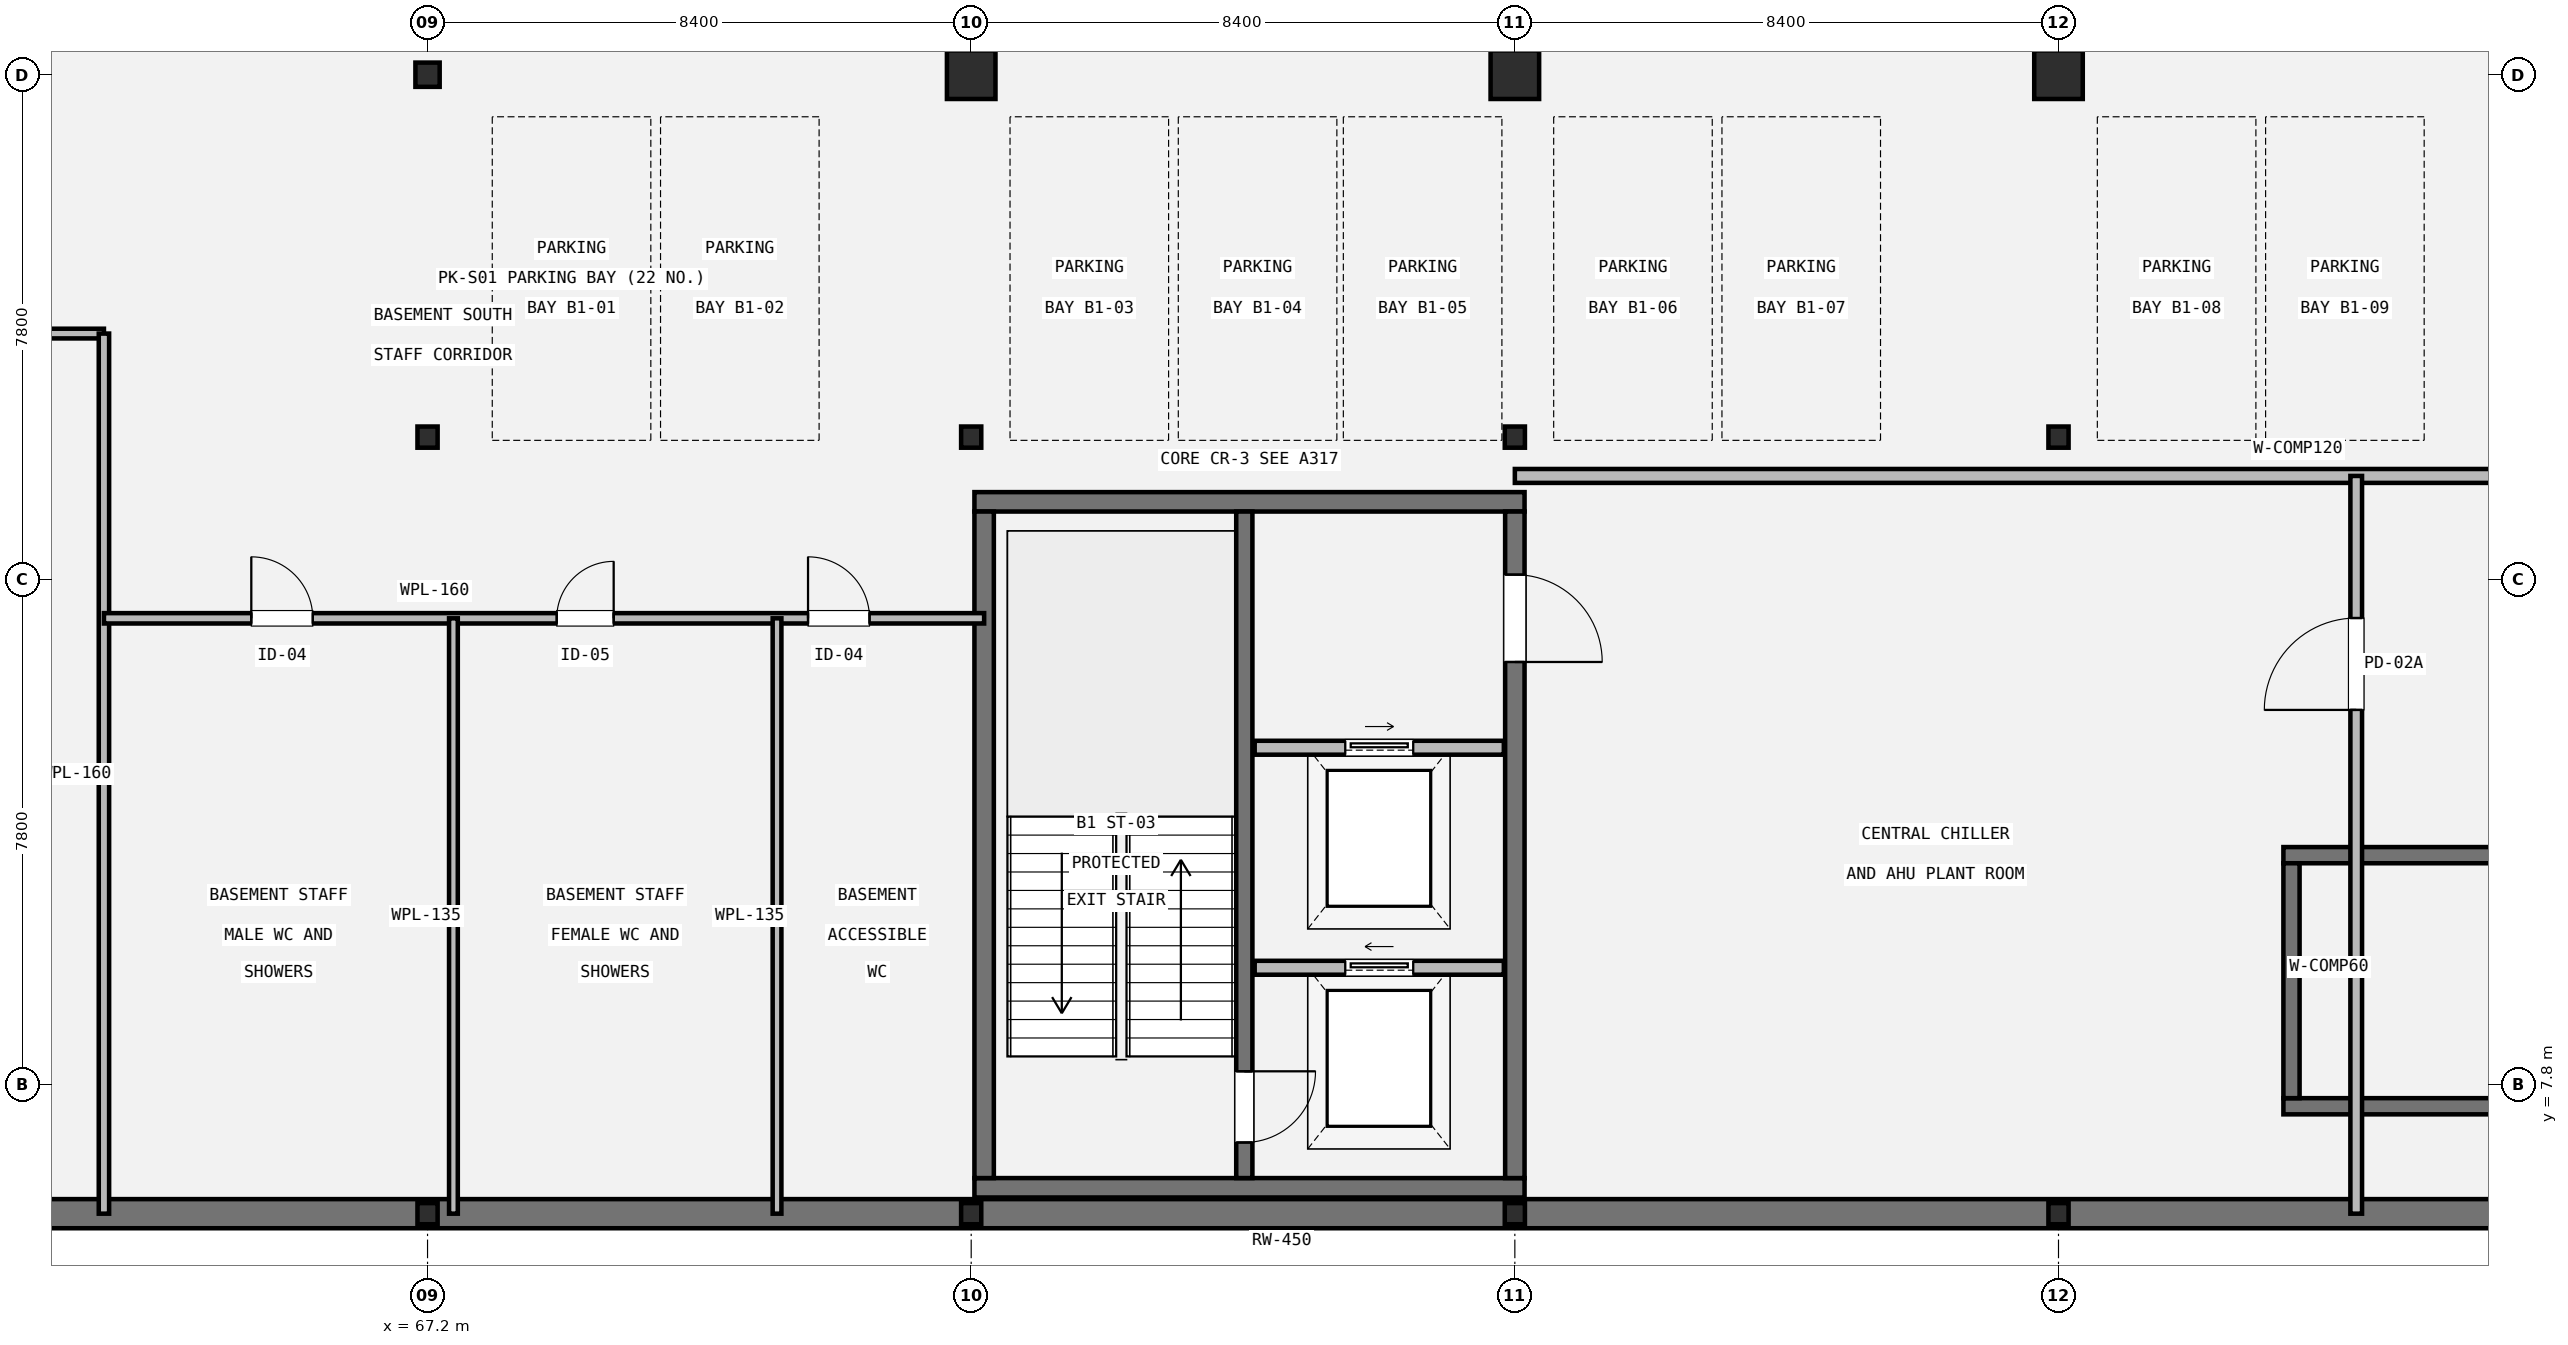
"""IFC4 building model, lengths in metres.
Left out: names, types, materials, properties, quantities, classifications, styles, units other than length and angle.
Written with IfcOpenShell. Run it as: python <this file> out.ifc"""

import sys

from ifc_helpers import new_model, si_unit, direction, frame, frame_2d, origin, origin_2d, place, context, subcontext, project, spatial, rectangle, i_section, extrude, element, fill, save


model = new_model("IFC4")
c1 = context("Model", 3, precision=1e-05, world=origin(), true_north=direction((0.0, 1.0)))
c2 = subcontext(c1, "Body", "Model", "MODEL_VIEW")
j1 = project(units=[si_unit("LENGTHUNIT", "METRE"), si_unit("PLANEANGLEUNIT", "RADIAN")], contexts=[c1])
p1 = place(None, origin())
s1 = spatial("IfcSite", under=j1, at=p1, CompositionType="ELEMENT")
p2 = place(p1, origin())
s2 = spatial("IfcBuilding", under=s1, at=p2, CompositionType="ELEMENT")
p3 = place(p2, frame((0.0, 0.0, -4.5)))
s3 = spatial("IfcBuildingStorey", under=s2, at=p3, CompositionType="ELEMENT", Elevation=-4.5)
p4 = place(p3, frame((67.2, 23.4, 0.0), z_axis=(0.0, 0.0, 1.0), x_axis=(1.0, 0.0, 0.0)))
e1 = element("IfcColumn", 1, at=p4, inside=s3, PredefinedType="COLUMN", context=c2, shape_type="SweptSolid", body=[
    extrude(i_section(OverallWidth=0.375, OverallDepth=0.375, WebThickness=0.017, FlangeThickness=0.027, FilletRadius=0.015, at=origin_2d()), origin(), (0.0, 0.0, 1.0), 4.5),
])
for number, where, z_axis, x_axis in (
    (2, (67.2, 5.8, 0.0), (0.0, 0.0, 1.0), (1.0, 0.0, 0.0)),
    (3, (67.2, 17.8, 0.0), (0.0, 0.0, 1.0), (1.0, 0.0, 0.0)),
    (4, (75.6, 5.8, 0.0), (0.0, 0.0, 1.0), (1.0, 0.0, 0.0)),
    (5, (75.6, 17.8, 0.0), (0.0, 0.0, 1.0), (1.0, 0.0, 0.0)),
    (6, (84.0, 5.8, 0.0), (0.0, 0.0, 1.0), (1.0, 0.0, 0.0)),
    (7, (84.0, 17.8, 0.0), (0.0, 0.0, 1.0), (1.0, 0.0, 0.0)),
    (8, (92.4, 5.8, 0.0), (0.0, 0.0, 1.0), (1.0, 0.0, 0.0)),
    (9, (92.4, 17.8, 0.0), (0.0, 0.0, 1.0), (1.0, 0.0, 0.0)),
):
    element("IfcColumn", number, at=place(p3, frame(where, z_axis=z_axis, x_axis=x_axis)), inside=s3, PredefinedType="COLUMN", context=c2, shape_type="SweptSolid", body=[
        extrude(i_section(OverallWidth=0.311, OverallDepth=0.327, WebThickness=0.016, FlangeThickness=0.025, FilletRadius=0.015, at=origin_2d()), origin(), (0.0, 0.0, 1.0), 4.5),
    ])
for number, where, z_axis, x_axis in (
    (10, (75.6, 23.4, 0.0), (0.0, 0.0, 1.0), (1.0, 0.0, 0.0)),
    (11, (84.0, 23.4, 0.0), (0.0, 0.0, 1.0), (1.0, 0.0, 0.0)),
    (12, (92.4, 23.4, 0.0), (0.0, 0.0, 1.0), (1.0, 0.0, 0.0)),
):
    element("IfcColumn", number, at=place(p3, frame(where, z_axis=z_axis, x_axis=x_axis)), inside=s3, PredefinedType="COLUMN", context=c2, shape_type="SweptSolid", body=[
        extrude(rectangle(XDim=0.75, YDim=0.75, at=origin_2d()), origin(), (0.0, 0.0, 1.0), 4.5),
    ])
p5 = place(p3, frame((117.6, 5.8, 0.0), z_axis=(0.0, 0.0, 1.0), x_axis=(-1.0, 0.0, 0.0)))
e13 = element("IfcWall", 13, at=p5, inside=s3, PredefinedType="USERDEFINED", context=c2, shape_type="SweptSolid", body=[
    extrude(rectangle(XDim=79.6, YDim=0.45, at=frame_2d((39.8, 0.0))), origin(), (0.0, 0.0, 1.0), 4.24),
])
for number, where, z_axis, x_axis in (
    (14, (106.285, 7.46, 0.0), (0.0, 0.0, 1.0), (-1.0, 0.0, 0.0)),
    (15, (95.875, 11.34, 0.0), (0.0, 0.0, 1.0), (1.0, 0.0, 0.0)),
):
    element("IfcWall", number, at=place(p3, frame(where, z_axis=z_axis, x_axis=x_axis)), inside=s3, PredefinedType="SHEAR", context=c2, shape_type="SweptSolid", body=[
        extrude(rectangle(XDim=10.41, YDim=0.25, at=frame_2d((5.205, 0.0))), origin(), (0.0, 0.0, 1.0), 4.24),
    ])
p6 = place(p3, frame((96.0, 7.585, 0.0), z_axis=(0.0, 0.0, 1.0), x_axis=(0.0, 1.0, 0.0)))
e16 = element("IfcWall", 16, at=p6, inside=s3, PredefinedType="SHEAR", context=c2, shape_type="SweptSolid", body=[
    extrude(rectangle(XDim=3.63, YDim=0.25, at=frame_2d((1.815, 0.0))), origin(), (0.0, 0.0, 1.0), 4.24),
])
for number, where, z_axis, x_axis in (
    (17, (84.15, 6.2, 0.0), (0.0, 0.0, 1.0), (-1.0, 0.0, 0.0)),
    (18, (75.65, 16.8, 0.0), (0.0, 0.0, 1.0), (1.0, 0.0, 0.0)),
):
    element("IfcWall", number, at=place(p3, frame(where, z_axis=z_axis, x_axis=x_axis)), inside=s3, PredefinedType="SHEAR", context=c2, shape_type="SweptSolid", body=[
        extrude(rectangle(XDim=8.5, YDim=0.3, at=frame_2d((4.25, 0.0))), origin(), (0.0, 0.0, 1.0), 4.25),
    ])
p7 = place(p3, frame((75.8, 6.35, 0.0), z_axis=(0.0, 0.0, 1.0), x_axis=(0.0, 1.0, 0.0)))
e19 = element("IfcWall", 19, at=p7, inside=s3, PredefinedType="SHEAR", context=c2, shape_type="SweptSolid", body=[
    extrude(rectangle(XDim=10.3, YDim=0.3, at=frame_2d((5.15, 0.0))), origin(), (0.0, 0.0, 1.0), 4.25),
])
p8 = place(p3, frame((84.0, 16.65, 0.0), z_axis=(0.0, 0.0, 1.0), x_axis=(0.0, -1.0, 0.0)))
e20 = element("IfcWall", 20, at=p8, inside=s3, PredefinedType="SHEAR", context=c2, shape_type="SweptSolid", body=[
    extrude(rectangle(XDim=10.3, YDim=0.3, at=frame_2d((5.15, 0.0))), origin(), (0.0, 0.0, 1.0), 4.25),
])
p9 = place(p8, frame((0.975, 0.0, 0.0)))
e21 = element("IfcOpeningElement", 21, at=p9, cuts=e20, PredefinedType="OPENING", context=c2, shape_type="SweptSolid", body=[
    extrude(rectangle(XDim=1.35, YDim=2.15, at=frame_2d((0.675, 1.075))), frame((0.0, 0.16, 0.0), z_axis=(0.0, -1.0, 0.0), x_axis=(1.0, 0.0, 0.0)), (0.0, 0.0, 1.0), 0.32),
])
p10 = place(p3, frame((79.82, 16.65, 0.0), z_axis=(0.0, 0.0, 1.0), x_axis=(0.0, -1.0, 0.0)))
e22 = element("IfcWall", 22, at=p10, inside=s3, PredefinedType="SHEAR", context=c2, shape_type="SweptSolid", body=[
    extrude(rectangle(XDim=10.3, YDim=0.25, at=frame_2d((5.15, 0.0))), origin(), (0.0, 0.0, 1.0), 4.25),
])
p11 = place(p10, frame((8.65, 0.0, 0.0)))
e23 = element("IfcOpeningElement", 23, at=p11, cuts=e22, PredefinedType="OPENING", context=c2, shape_type="SweptSolid", body=[
    extrude(rectangle(XDim=1.1, YDim=2.15, at=frame_2d((0.55, 1.075))), frame((0.0, 0.135, 0.0), z_axis=(0.0, -1.0, 0.0), x_axis=(1.0, 0.0, 0.0)), (0.0, 0.0, 1.0), 0.27),
])
p12 = place(p3, frame((79.98, 9.6, 0.0), z_axis=(0.0, 0.0, 1.0), x_axis=(1.0, 0.0, 0.0)))
e24 = element("IfcWall", 24, at=p12, inside=s3, PredefinedType="STANDARD", context=c2, shape_type="SweptSolid", body=[
    extrude(rectangle(XDim=3.85, YDim=0.215, at=frame_2d((1.925, 0.0))), origin(), (0.0, 0.0, 1.0), 3.625),
])
p13 = place(p12, frame((1.4, 0.0, 0.0)))
e25 = element("IfcOpeningElement", 25, at=p13, cuts=e24, PredefinedType="OPENING", context=c2, shape_type="SweptSolid", body=[
    extrude(rectangle(XDim=1.05, YDim=2.15, at=frame_2d((0.525, 1.075))), frame((0.0, 0.117, 0.0), z_axis=(0.0, -1.0, 0.0), x_axis=(1.0, 0.0, 0.0)), (0.0, 0.0, 1.0), 0.235),
])
p14 = place(p3, frame((79.98, 13.0, 0.0), z_axis=(0.0, 0.0, 1.0), x_axis=(1.0, 0.0, 0.0)))
e26 = element("IfcWall", 26, at=p14, inside=s3, PredefinedType="STANDARD", context=c2, shape_type="SweptSolid", body=[
    extrude(rectangle(XDim=3.85, YDim=0.215, at=frame_2d((1.925, 0.0))), origin(), (0.0, 0.0, 1.0), 3.625),
])
p15 = place(p14, frame((1.4, 0.0, 0.0)))
e27 = element("IfcOpeningElement", 27, at=p15, cuts=e26, PredefinedType="OPENING", context=c2, shape_type="SweptSolid", body=[
    extrude(rectangle(XDim=1.05, YDim=2.15, at=frame_2d((0.525, 1.075))), frame((0.0, 0.117, 0.0), z_axis=(0.0, -1.0, 0.0), x_axis=(1.0, 0.0, 0.0)), (0.0, 0.0, 1.0), 0.235),
])
p16 = place(p3, frame((33.6, 19.4, 0.0), z_axis=(0.0, 0.0, 1.0), x_axis=(1.0, 0.0, 0.0)))
e28 = element("IfcWall", 28, at=p16, inside=s3, PredefinedType="PARTITIONING", context=c2, shape_type="SweptSolid", body=[
    extrude(rectangle(XDim=28.6, YDim=0.15, at=frame_2d((14.3, 0.0))), origin(), (0.0, 0.0, 1.0), 3.703),
])
p17 = place(p16, frame((6.895, 0.0, 0.0)))
e29 = element("IfcOpeningElement", 29, at=p17, cuts=e28, PredefinedType="OPENING", context=c2, shape_type="SweptSolid", body=[
    extrude(rectangle(XDim=1.02, YDim=2.1, at=frame_2d((0.51, 1.05))), frame((0.0, 0.085, 0.0), z_axis=(0.0, -1.0, 0.0), x_axis=(1.0, 0.0, 0.0)), (0.0, 0.0, 1.0), 0.17),
])
p18 = place(p16, frame((20.685, 0.0, 0.0)))
e30 = element("IfcOpeningElement", 30, at=p18, cuts=e28, PredefinedType="OPENING", context=c2, shape_type="SweptSolid", body=[
    extrude(rectangle(XDim=1.02, YDim=2.1, at=frame_2d((0.51, 1.05))), frame((0.0, 0.085, 0.0), z_axis=(0.0, -1.0, 0.0), x_axis=(1.0, 0.0, 0.0)), (0.0, 0.0, 1.0), 0.17),
])
p19 = place(p3, frame((62.2, 5.8, 0.0), z_axis=(0.0, 0.0, 1.0), x_axis=(0.0, 1.0, 0.0)))
e31 = element("IfcWall", 31, at=p19, inside=s3, PredefinedType="PLUMBINGWALL", context=c2, shape_type="SweptSolid", body=[
    extrude(rectangle(XDim=13.6, YDim=0.16, at=frame_2d((6.8, 0.0))), origin(), (0.0, 0.0, 1.0), 3.709),
])
p20 = place(p3, frame((62.2, 15.0, 0.0), z_axis=(0.0, 0.0, 1.0), x_axis=(1.0, 0.0, 0.0)))
e32 = element("IfcWall", 32, at=p20, inside=s3, PredefinedType="PLUMBINGWALL", context=c2, shape_type="SweptSolid", body=[
    extrude(rectangle(XDim=13.6, YDim=0.16, at=frame_2d((6.8, 0.0))), origin(), (0.0, 0.0, 1.0), 3.472),
])
p21 = place(p20, frame((2.277, 0.0, 0.0)))
e33 = element("IfcOpeningElement", 33, at=p21, cuts=e32, PredefinedType="OPENING", context=c2, shape_type="SweptSolid", body=[
    extrude(rectangle(XDim=0.95, YDim=2.1, at=frame_2d((0.475, 1.05))), frame((0.0, 0.09, 0.0), z_axis=(0.0, -1.0, 0.0), x_axis=(1.0, 0.0, 0.0)), (0.0, 0.0, 1.0), 0.18),
])
p22 = place(p20, frame((6.996, 0.0, 0.0)))
e34 = element("IfcOpeningElement", 34, at=p22, cuts=e32, PredefinedType="OPENING", context=c2, shape_type="SweptSolid", body=[
    extrude(rectangle(XDim=0.88, YDim=2.05, at=frame_2d((0.44, 1.025))), frame((0.0, 0.09, 0.0), z_axis=(0.0, -1.0, 0.0), x_axis=(1.0, 0.0, 0.0)), (0.0, 0.0, 1.0), 0.18),
])
p23 = place(p20, frame((10.879, 0.0, 0.0)))
e35 = element("IfcOpeningElement", 35, at=p23, cuts=e32, PredefinedType="OPENING", context=c2, shape_type="SweptSolid", body=[
    extrude(rectangle(XDim=0.95, YDim=2.1, at=frame_2d((0.475, 1.05))), frame((0.0, 0.09, 0.0), z_axis=(0.0, -1.0, 0.0), x_axis=(1.0, 0.0, 0.0)), (0.0, 0.0, 1.0), 0.18),
])
for number, where, z_axis, x_axis in (
    (36, (67.6, 5.8, 0.0), (0.0, 0.0, 1.0), (0.0, 1.0, 0.0)),
    (37, (72.6, 5.8, 0.0), (0.0, 0.0, 1.0), (0.0, 1.0, 0.0)),
):
    element("IfcWall", number, at=place(p3, frame(where, z_axis=z_axis, x_axis=x_axis)), inside=s3, PredefinedType="PLUMBINGWALL", context=c2, shape_type="SweptSolid", body=[
        extrude(rectangle(XDim=9.2, YDim=0.135, at=frame_2d((4.6, 0.0))), origin(), (0.0, 0.0, 1.0), 3.709),
    ])
p24 = place(p3, frame((84.0, 17.2, 0.0), z_axis=(0.0, 0.0, 1.0), x_axis=(1.0, 0.0, 0.0)))
e38 = element("IfcWall", 38, at=p24, inside=s3, PredefinedType="STANDARD", context=c2, shape_type="SweptSolid", body=[
    extrude(rectangle(XDim=33.6, YDim=0.215, at=frame_2d((16.8, 0.0))), origin(), (0.0, 0.0, 1.0), 3.625),
])
p25 = place(p24, frame((27.433, 0.0, 0.0)))
e39 = element("IfcOpeningElement", 39, at=p25, cuts=e38, PredefinedType="OPENING", context=c2, shape_type="SweptSolid", body=[
    extrude(rectangle(XDim=1.25, YDim=2.15, at=frame_2d((0.625, 1.075))), frame((0.0, 0.117, 0.0), z_axis=(0.0, -1.0, 0.0), x_axis=(1.0, 0.0, 0.0)), (0.0, 0.0, 1.0), 0.235),
])
p26 = place(p3, frame((97.0, 5.8, 0.0), z_axis=(0.0, 0.0, 1.0), x_axis=(0.0, 1.0, 0.0)))
e40 = element("IfcWall", 40, at=p26, inside=s3, PredefinedType="STANDARD", context=c2, shape_type="SweptSolid", body=[
    extrude(rectangle(XDim=11.4, YDim=0.18, at=frame_2d((5.7, 0.0))), origin(), (0.0, 0.0, 1.0), 3.709),
])
p27 = place(p26, frame((7.784, 0.0, 0.0)))
e41 = element("IfcOpeningElement", 41, at=p27, cuts=e40, PredefinedType="OPENING", context=c2, shape_type="SweptSolid", body=[
    extrude(rectangle(XDim=1.42, YDim=2.2, at=frame_2d((0.71, 1.1))), frame((0.0, 0.1, 0.0), z_axis=(0.0, -1.0, 0.0), x_axis=(1.0, 0.0, 0.0)), (0.0, 0.0, 1.0), 0.2),
])
p28 = place(p11, origin())
e42 = element("IfcDoor", 42, at=p28, inside=s3, OperationType="SINGLE_SWING_LEFT", PredefinedType="DOOR", context=c2, shape_type="SweptSolid", body=[
    extrude(rectangle(XDim=1.1, YDim=2.15, at=frame_2d((0.55, 1.075))), frame((0.0, 0.025, 0.0), z_axis=(0.0, -1.0, 0.0), x_axis=(1.0, 0.0, 0.0)), (0.0, 0.0, 1.0), 0.05),
])
fill(e23, e42)
p29 = place(p9, origin())
e43 = element("IfcDoor", 43, at=p29, inside=s3, OperationType="SINGLE_SWING_RIGHT", PredefinedType="DOOR", context=c2, shape_type="SweptSolid", body=[
    extrude(rectangle(XDim=1.35, YDim=2.15, at=frame_2d((0.675, 1.075))), frame((0.0, 0.025, 0.0), z_axis=(0.0, -1.0, 0.0), x_axis=(1.0, 0.0, 0.0)), (0.0, 0.0, 1.0), 0.05),
])
fill(e21, e43)
p30 = place(p13, origin())
e44 = element("IfcDoor", 44, at=p30, inside=s3, OperationType="SLIDING_TO_LEFT", PredefinedType="DOOR", context=c2, shape_type="SweptSolid", body=[
    extrude(rectangle(XDim=1.05, YDim=2.15, at=frame_2d((0.525, 1.075))), frame((0.0, 0.025, 0.0), z_axis=(0.0, -1.0, 0.0), x_axis=(1.0, 0.0, 0.0)), (0.0, 0.0, 1.0), 0.05),
])
fill(e25, e44)
p31 = place(p15, origin())
e45 = element("IfcDoor", 45, at=p31, inside=s3, OperationType="SLIDING_TO_RIGHT", PredefinedType="DOOR", context=c2, shape_type="SweptSolid", body=[
    extrude(rectangle(XDim=1.05, YDim=2.15, at=frame_2d((0.525, 1.075))), frame((0.0, 0.025, 0.0), z_axis=(0.0, -1.0, 0.0), x_axis=(1.0, 0.0, 0.0)), (0.0, 0.0, 1.0), 0.05),
])
fill(e27, e45)
p32 = place(p21, origin())
e46 = element("IfcDoor", 46, at=p32, inside=s3, OperationType="SINGLE_SWING_LEFT", PredefinedType="DOOR", context=c2, shape_type="SweptSolid", body=[
    extrude(rectangle(XDim=0.95, YDim=2.1, at=frame_2d((0.475, 1.05))), frame((0.0, 0.025, 0.0), z_axis=(0.0, -1.0, 0.0), x_axis=(1.0, 0.0, 0.0)), (0.0, 0.0, 1.0), 0.05),
])
fill(e33, e46)
p33 = place(p22, origin())
e47 = element("IfcDoor", 47, at=p33, inside=s3, OperationType="SINGLE_SWING_RIGHT", PredefinedType="DOOR", context=c2, shape_type="SweptSolid", body=[
    extrude(rectangle(XDim=0.88, YDim=2.05, at=frame_2d((0.44, 1.025))), frame((0.0, 0.025, 0.0), z_axis=(0.0, -1.0, 0.0), x_axis=(1.0, 0.0, 0.0)), (0.0, 0.0, 1.0), 0.05),
])
fill(e34, e47)
p34 = place(p23, origin())
e48 = element("IfcDoor", 48, at=p34, inside=s3, OperationType="SINGLE_SWING_LEFT", PredefinedType="DOOR", context=c2, shape_type="SweptSolid", body=[
    extrude(rectangle(XDim=0.95, YDim=2.1, at=frame_2d((0.475, 1.05))), frame((0.0, 0.025, 0.0), z_axis=(0.0, -1.0, 0.0), x_axis=(1.0, 0.0, 0.0)), (0.0, 0.0, 1.0), 0.05),
])
fill(e35, e48)
p35 = place(p27, origin())
e49 = element("IfcDoor", 49, at=p35, inside=s3, OperationType="SINGLE_SWING_LEFT", PredefinedType="DOOR", context=c2, shape_type="SweptSolid", body=[
    extrude(rectangle(XDim=1.42, YDim=2.2, at=frame_2d((0.71, 1.1))), frame((0.0, 0.025, 0.0), z_axis=(0.0, -1.0, 0.0), x_axis=(1.0, 0.0, 0.0)), (0.0, 0.0, 1.0), 0.05),
])
fill(e41, e49)
save(model, sys.argv[1])
